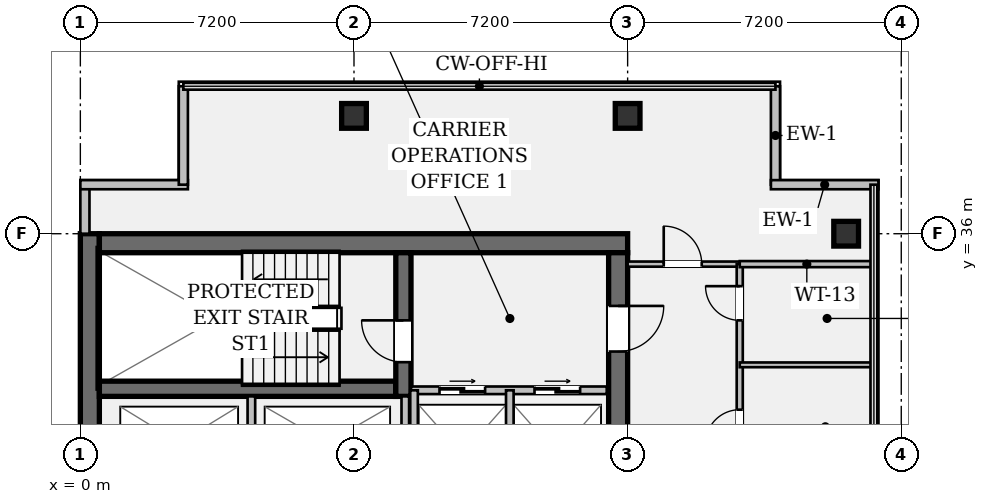
"""IFC4 building model, lengths in metres.
Left out: names, types, materials, properties, quantities, classifications, styles, units other than length and angle.
Written with IfcOpenShell. Run it as: python <this file> out.ifc"""

import sys

from ifc_helpers import new_model, si_unit, direction, frame, frame_2d, origin, origin_2d, place, context, subcontext, project, spatial, rectangle, hollow_rectangle, extrude, element, fill, save


model = new_model("IFC4")
c1 = context("Model", 3, precision=1e-05, world=origin(), true_north=direction((0.0, 1.0)))
c2 = subcontext(c1, "Body", "Model", "MODEL_VIEW")
j1 = project(units=[si_unit("LENGTHUNIT", "METRE"), si_unit("PLANEANGLEUNIT", "RADIAN")], contexts=[c1])
p1 = place(None, origin())
s1 = spatial("IfcSite", under=j1, at=p1, CompositionType="ELEMENT")
p2 = place(p1, origin())
s2 = spatial("IfcBuilding", under=s1, at=p2, CompositionType="ELEMENT")
p3 = place(p2, frame((0.0, 0.0, 265.65)))
s3 = spatial("IfcBuildingStorey", under=s2, at=p3, CompositionType="ELEMENT", Elevation=265.65)
p4 = place(p3, frame((0.25, 7.2, 0.0), z_axis=(0.0, 0.0, 1.0), x_axis=(0.0, 1.0, 0.0)))
e1 = element("IfcWall", 1, at=p4, inside=s3, PredefinedType="SHEAR", context=c2, shape_type="SweptSolid", body=[
    extrude(rectangle(XDim=28.8, YDim=0.5, at=frame_2d((14.4, 0.0))), origin(), (0.0, 0.0, 1.0), 3.24),
])
p5 = place(p3, frame((0.5, 35.75, 0.0), z_axis=(0.0, 0.0, 1.0), x_axis=(1.0, 0.0, 0.0)))
e2 = element("IfcWall", 2, at=p5, inside=s3, PredefinedType="SHEAR", context=c2, shape_type="SweptSolid", body=[
    extrude(rectangle(XDim=13.9, YDim=0.5, at=frame_2d((6.95, 0.0))), origin(), (0.0, 0.0, 1.0), 3.24),
])
p6 = place(p3, frame((14.15, 35.5, 0.0), z_axis=(0.0, 0.0, 1.0), x_axis=(0.0, -1.0, 0.0)))
e3 = element("IfcWall", 3, at=p6, inside=s3, PredefinedType="SHEAR", context=c2, shape_type="SweptSolid", body=[
    extrude(rectangle(XDim=27.8, YDim=0.5, at=frame_2d((13.9, 0.0))), origin(), (0.0, 0.0, 1.0), 3.24),
])
p7 = place(p6, frame((1.4, 0.0, 0.0)))
e4 = element("IfcOpeningElement", 4, at=p7, cuts=e3, PredefinedType="OPENING", context=c2, shape_type="SweptSolid", body=[
    extrude(rectangle(XDim=1.2, YDim=2.15, at=frame_2d((0.6, 1.075))), frame((0.0, 0.262, 0.0), z_axis=(0.0, -1.0, 0.0), x_axis=(1.0, 0.0, 0.0)), (0.0, 0.0, 1.0), 0.524),
])
p8 = place(p6, frame((25.35, 0.0, 0.0)))
e5 = element("IfcOpeningElement", 5, at=p8, cuts=e3, PredefinedType="OPENING", context=c2, shape_type="SweptSolid", body=[
    extrude(rectangle(XDim=1.2, YDim=2.15, at=frame_2d((0.6, 1.075))), frame((0.0, 0.262, 0.0), z_axis=(0.0, -1.0, 0.0), x_axis=(1.0, 0.0, 0.0)), (0.0, 0.0, 1.0), 0.524),
])
p9 = place(p6, frame((14.7, 0.0, 0.0)))
e6 = element("IfcOpeningElement", 6, at=p9, cuts=e3, PredefinedType="OPENING", context=c2, shape_type="SweptSolid", body=[
    extrude(rectangle(XDim=1.6, YDim=2.2, at=frame_2d((0.8, 1.1))), frame((0.0, 0.262, 0.0), z_axis=(0.0, -1.0, 0.0), x_axis=(1.0, 0.0, 0.0)), (0.0, 0.0, 1.0), 0.524),
])
p10 = place(p3, frame((0.5, 31.92, 0.0), z_axis=(0.0, 0.0, 1.0), x_axis=(1.0, 0.0, 0.0)))
e7 = element("IfcWall", 7, at=p10, inside=s3, PredefinedType="SHEAR", context=c2, shape_type="SweptSolid", body=[
    extrude(rectangle(XDim=7.8, YDim=0.4, at=frame_2d((3.9, 0.0))), origin(), (0.0, 0.0, 1.0), 3.24),
])
p11 = place(p3, frame((8.5, 31.72, 0.0), z_axis=(0.0, 0.0, 1.0), x_axis=(0.0, 1.0, 0.0)))
e8 = element("IfcWall", 8, at=p11, inside=s3, PredefinedType="SHEAR", context=c2, shape_type="SweptSolid", body=[
    extrude(rectangle(XDim=3.78, YDim=0.4, at=frame_2d((1.89, 0.0))), origin(), (0.0, 0.0, 1.0), 3.24),
])
p12 = place(p11, frame((0.9, 0.0, 0.0)))
e9 = element("IfcOpeningElement", 9, at=p12, cuts=e8, PredefinedType="OPENING", context=c2, shape_type="SweptSolid", body=[
    extrude(rectangle(XDim=1.1, YDim=2.15, at=frame_2d((0.55, 1.075))), frame((0.0, 0.212, 0.0), z_axis=(0.0, -1.0, 0.0), x_axis=(1.0, 0.0, 0.0)), (0.0, 0.0, 1.0), 0.424),
])
for number, where, z_axis, x_axis in (
    (10, (7.2, 39.1, 0.0), (0.0, 0.0, 1.0), (1.0, 0.0, 0.0)),
    (11, (14.4, 39.1, 0.0), (0.0, 0.0, 1.0), (1.0, 0.0, 0.0)),
    (12, (20.15, 36.0, 0.0), (0.0, 0.0, 1.0), (1.0, 0.0, 0.0)),
):
    element("IfcColumn", number, at=place(p3, frame(where, z_axis=z_axis, x_axis=x_axis)), inside=s3, PredefinedType="COLUMN", context=c2, shape_type="SweptSolid", body=[
        extrude(hollow_rectangle(XDim=0.65, YDim=0.65, WallThickness=0.04, at=origin_2d()), origin(), (0.0, 0.0, 1.0), 3.24),
    ])
p13 = place(p3, frame((0.12, 36.0, 0.0), z_axis=(0.0, 0.0, 1.0), x_axis=(0.0, 1.0, 0.0)))
e13 = element("IfcWall", 13, at=p13, inside=s3, PredefinedType="STANDARD", context=c2, shape_type="SweptSolid", body=[
    extrude(rectangle(XDim=1.29, YDim=0.24, at=frame_2d((0.645, 0.0))), origin(), (0.0, 0.0, 1.0), 3.24),
])
p14 = place(p3, frame((0.0, 37.29, 0.0), z_axis=(0.0, 0.0, 1.0), x_axis=(1.0, 0.0, 0.0)))
e14 = element("IfcWall", 14, at=p14, inside=s3, PredefinedType="STANDARD", context=c2, shape_type="SweptSolid", body=[
    extrude(rectangle(XDim=2.83, YDim=0.24, at=frame_2d((1.415, 0.0))), origin(), (0.0, 0.0, 1.0), 3.24),
])
for number, where, z_axis, x_axis in (
    (15, (2.71, 37.29, 0.0), (0.0, 0.0, 1.0), (0.0, 1.0, 0.0)),
    (16, (18.29, 39.88, 0.0), (0.0, 0.0, 1.0), (0.0, -1.0, 0.0)),
):
    element("IfcWall", number, at=place(p3, frame(where, z_axis=z_axis, x_axis=x_axis)), inside=s3, PredefinedType="STANDARD", context=c2, shape_type="SweptSolid", body=[
        extrude(rectangle(XDim=2.59, YDim=0.24, at=frame_2d((1.295, 0.0))), origin(), (0.0, 0.0, 1.0), 3.24),
    ])
p15 = place(p3, frame((18.17, 37.29, 0.0), z_axis=(0.0, 0.0, 1.0), x_axis=(1.0, 0.0, 0.0)))
e17 = element("IfcWall", 17, at=p15, inside=s3, PredefinedType="STANDARD", context=c2, shape_type="SweptSolid", body=[
    extrude(rectangle(XDim=2.83, YDim=0.24, at=frame_2d((1.415, 0.0))), origin(), (0.0, 0.0, 1.0), 3.24),
])
p16 = place(p3, frame((8.7, 31.88, 0.0), z_axis=(0.0, 0.0, 1.0), x_axis=(1.0, 0.0, 0.0)))
e18 = element("IfcWall", 18, at=p16, inside=s3, PredefinedType="PARTITIONING", context=c2, shape_type="SweptSolid", body=[
    extrude(rectangle(XDim=5.15, YDim=0.2, at=frame_2d((2.575, 0.0))), origin(), (0.0, 0.0, 1.0), 3.24),
])
p17 = place(p16, frame((0.75, 0.0, 0.0)))
e19 = element("IfcOpeningElement", 19, at=p17, cuts=e18, PredefinedType="OPENING", context=c2, shape_type="SweptSolid", body=[
    extrude(rectangle(XDim=1.2, YDim=2.2, at=frame_2d((0.6, 1.1))), frame((0.0, 0.112, 0.0), z_axis=(0.0, -1.0, 0.0), x_axis=(1.0, 0.0, 0.0)), (0.0, 0.0, 1.0), 0.224),
])
p18 = place(p16, frame((3.25, 0.0, 0.0)))
e20 = element("IfcOpeningElement", 20, at=p18, cuts=e18, PredefinedType="OPENING", context=c2, shape_type="SweptSolid", body=[
    extrude(rectangle(XDim=1.2, YDim=2.2, at=frame_2d((0.6, 1.1))), frame((0.0, 0.112, 0.0), z_axis=(0.0, -1.0, 0.0), x_axis=(1.0, 0.0, 0.0)), (0.0, 0.0, 1.0), 0.224),
])
for number, where, z_axis, x_axis in (
    (21, (8.78, 28.78, 0.0), (0.0, 0.0, 1.0), (0.0, 1.0, 0.0)),
    (22, (11.3, 28.78, 0.0), (0.0, 0.0, 1.0), (0.0, 1.0, 0.0)),
):
    element("IfcWall", number, at=place(p3, frame(where, z_axis=z_axis, x_axis=x_axis)), inside=s3, PredefinedType="PARTITIONING", context=c2, shape_type="SweptSolid", body=[
        extrude(rectangle(XDim=3.1, YDim=0.2, at=frame_2d((1.55, 0.0))), origin(), (0.0, 0.0, 1.0), 3.24),
    ])
for number, where, z_axis, x_axis in (
    (23, (4.5, 28.78, 0.0), (0.0, 0.0, 1.0), (0.0, 1.0, 0.0)),
    (24, (8.55, 28.78, 0.0), (0.0, 0.0, 1.0), (0.0, 1.0, 0.0)),
):
    element("IfcWall", number, at=place(p3, frame(where, z_axis=z_axis, x_axis=x_axis)), inside=s3, PredefinedType="PARTITIONING", context=c2, shape_type="SweptSolid", body=[
        extrude(rectangle(XDim=2.94, YDim=0.2, at=frame_2d((1.47, 0.0))), origin(), (0.0, 0.0, 1.0), 3.24),
    ])
p19 = place(p3, frame((14.4, 35.2, 0.0), z_axis=(0.0, 0.0, 1.0), x_axis=(1.0, 0.0, 0.0)))
e25 = element("IfcWall", 25, at=p19, inside=s3, PredefinedType="PARTITIONING", context=c2, shape_type="SweptSolid", body=[
    extrude(rectangle(XDim=2.95, YDim=0.135, at=frame_2d((1.475, 0.0))), origin(), (0.0, 0.0, 1.0), 2.808),
])
p20 = place(p19, frame((0.95, 0.0, 0.0)))
e26 = element("IfcOpeningElement", 26, at=p20, cuts=e25, PredefinedType="OPENING", context=c2, shape_type="SweptSolid", body=[
    extrude(rectangle(XDim=1.0, YDim=2.15, at=frame_2d((0.5, 1.075))), frame((0.0, 0.08, 0.0), z_axis=(0.0, -1.0, 0.0), x_axis=(1.0, 0.0, 0.0)), (0.0, 0.0, 1.0), 0.159),
])
p21 = place(p3, frame((17.35, 19.95, 0.0), z_axis=(0.0, 0.0, 1.0), x_axis=(0.0, 1.0, 0.0)))
e27 = element("IfcWall", 27, at=p21, inside=s3, PredefinedType="PARTITIONING", context=c2, shape_type="SweptSolid", body=[
    extrude(rectangle(XDim=15.25, YDim=0.16, at=frame_2d((7.625, 0.0))), origin(), (0.0, 0.0, 1.0), 2.676),
])
p22 = place(p21, frame((4.02, 0.0, 0.0)))
e28 = element("IfcOpeningElement", 28, at=p22, cuts=e27, PredefinedType="OPENING", context=c2, shape_type="SweptSolid", body=[
    extrude(rectangle(XDim=0.9, YDim=2.15, at=frame_2d((0.45, 1.075))), frame((0.0, 0.092, 0.0), z_axis=(0.0, -1.0, 0.0), x_axis=(1.0, 0.0, 0.0)), (0.0, 0.0, 1.0), 0.184),
])
p23 = place(p21, frame((7.27, 0.0, 0.0)))
e29 = element("IfcOpeningElement", 29, at=p23, cuts=e27, PredefinedType="OPENING", context=c2, shape_type="SweptSolid", body=[
    extrude(rectangle(XDim=0.9, YDim=2.15, at=frame_2d((0.45, 1.075))), frame((0.0, 0.092, 0.0), z_axis=(0.0, -1.0, 0.0), x_axis=(1.0, 0.0, 0.0)), (0.0, 0.0, 1.0), 0.184),
])
p24 = place(p21, frame((10.52, 0.0, 0.0)))
e30 = element("IfcOpeningElement", 30, at=p24, cuts=e27, PredefinedType="OPENING", context=c2, shape_type="SweptSolid", body=[
    extrude(rectangle(XDim=0.9, YDim=2.15, at=frame_2d((0.45, 1.075))), frame((0.0, 0.092, 0.0), z_axis=(0.0, -1.0, 0.0), x_axis=(1.0, 0.0, 0.0)), (0.0, 0.0, 1.0), 0.184),
])
p25 = place(p21, frame((13.77, 0.0, 0.0)))
e31 = element("IfcOpeningElement", 31, at=p25, cuts=e27, PredefinedType="OPENING", context=c2, shape_type="SweptSolid", body=[
    extrude(rectangle(XDim=0.9, YDim=2.15, at=frame_2d((0.45, 1.075))), frame((0.0, 0.092, 0.0), z_axis=(0.0, -1.0, 0.0), x_axis=(1.0, 0.0, 0.0)), (0.0, 0.0, 1.0), 0.184),
])
p26 = place(p3, frame((17.35, 35.2, 0.0), z_axis=(0.0, 0.0, 1.0), x_axis=(1.0, 0.0, 0.0)))
e32 = element("IfcWall", 32, at=p26, inside=s3, PredefinedType="PARTITIONING", context=c2, shape_type="SweptSolid", body=[
    extrude(rectangle(XDim=3.53, YDim=0.16, at=frame_2d((1.765, 0.0))), origin(), (0.0, 0.0, 1.0), 2.808),
])
p27 = place(p3, frame((20.9, 22.7, 0.0), z_axis=(0.0, 0.0, 1.0), x_axis=(0.0, 1.0, 0.0)))
e33 = element("IfcWall", 33, at=p27, inside=s3, PredefinedType="PARTITIONING", context=c2, shape_type="SweptSolid", body=[
    extrude(rectangle(XDim=12.5, YDim=0.135, at=frame_2d((6.25, 0.0))), origin(), (0.0, 0.0, 1.0), 3.24),
])
p28 = place(p3, frame((17.35, 32.55, 0.0), z_axis=(0.0, 0.0, 1.0), x_axis=(1.0, 0.0, 0.0)))
e34 = element("IfcWall", 34, at=p28, inside=s3, PredefinedType="PARTITIONING", context=c2, shape_type="SweptSolid", body=[
    extrude(rectangle(XDim=3.55, YDim=0.125, at=frame_2d((1.775, 0.0))), origin(), (0.0, 0.0, 1.0), 2.808),
])
p29 = place(p12, origin())
e35 = element("IfcDoor", 35, at=p29, inside=s3, OperationType="SINGLE_SWING_RIGHT", PredefinedType="DOOR", context=c2, shape_type="SweptSolid", body=[
    extrude(rectangle(XDim=1.1, YDim=2.15, at=frame_2d((0.55, 1.075))), frame((0.0, 0.025, 0.0), z_axis=(0.0, -1.0, 0.0), x_axis=(1.0, 0.0, 0.0)), (0.0, 0.0, 1.0), 0.05),
])
fill(e9, e35)
p30 = place(p7, origin())
e36 = element("IfcDoor", 36, at=p30, inside=s3, OperationType="SINGLE_SWING_LEFT", PredefinedType="DOOR", context=c2, shape_type="SweptSolid", body=[
    extrude(rectangle(XDim=1.2, YDim=2.15, at=frame_2d((0.6, 1.075))), frame((0.0, 0.025, 0.0), z_axis=(0.0, -1.0, 0.0), x_axis=(1.0, 0.0, 0.0)), (0.0, 0.0, 1.0), 0.05),
])
fill(e4, e36)
p31 = place(p17, origin())
e37 = element("IfcDoor", 37, at=p31, inside=s3, OperationType="DOUBLE_DOOR_SLIDING", PredefinedType="DOOR", context=c2, shape_type="SweptSolid", body=[
    extrude(rectangle(XDim=1.2, YDim=2.2, at=frame_2d((0.6, 1.1))), frame((0.0, 0.025, 0.0), z_axis=(0.0, -1.0, 0.0), x_axis=(1.0, 0.0, 0.0)), (0.0, 0.0, 1.0), 0.05),
])
fill(e19, e37)
p32 = place(p18, origin())
e38 = element("IfcDoor", 38, at=p32, inside=s3, OperationType="DOUBLE_DOOR_SLIDING", PredefinedType="DOOR", context=c2, shape_type="SweptSolid", body=[
    extrude(rectangle(XDim=1.2, YDim=2.2, at=frame_2d((0.6, 1.1))), frame((0.0, 0.025, 0.0), z_axis=(0.0, -1.0, 0.0), x_axis=(1.0, 0.0, 0.0)), (0.0, 0.0, 1.0), 0.05),
])
fill(e20, e38)
p33 = place(p20, origin())
e39 = element("IfcDoor", 39, at=p33, inside=s3, OperationType="SINGLE_SWING_LEFT", PredefinedType="DOOR", context=c2, shape_type="SweptSolid", body=[
    extrude(rectangle(XDim=1.0, YDim=2.15, at=frame_2d((0.5, 1.075))), frame((0.0, 0.025, 0.0), z_axis=(0.0, -1.0, 0.0), x_axis=(1.0, 0.0, 0.0)), (0.0, 0.0, 1.0), 0.05),
])
fill(e26, e39)
p34 = place(p24, origin())
e40 = element("IfcDoor", 40, at=p34, inside=s3, OperationType="SINGLE_SWING_LEFT", PredefinedType="DOOR", context=c2, shape_type="SweptSolid", body=[
    extrude(rectangle(XDim=0.9, YDim=2.15, at=frame_2d((0.45, 1.075))), frame((0.0, 0.025, 0.0), z_axis=(0.0, -1.0, 0.0), x_axis=(1.0, 0.0, 0.0)), (0.0, 0.0, 1.0), 0.05),
])
fill(e30, e40)
p35 = place(p25, origin())
e41 = element("IfcDoor", 41, at=p35, inside=s3, OperationType="SINGLE_SWING_RIGHT", PredefinedType="DOOR", context=c2, shape_type="SweptSolid", body=[
    extrude(rectangle(XDim=0.9, YDim=2.15, at=frame_2d((0.45, 1.075))), frame((0.0, 0.025, 0.0), z_axis=(0.0, -1.0, 0.0), x_axis=(1.0, 0.0, 0.0)), (0.0, 0.0, 1.0), 0.05),
])
fill(e31, e41)
save(model, sys.argv[1])
